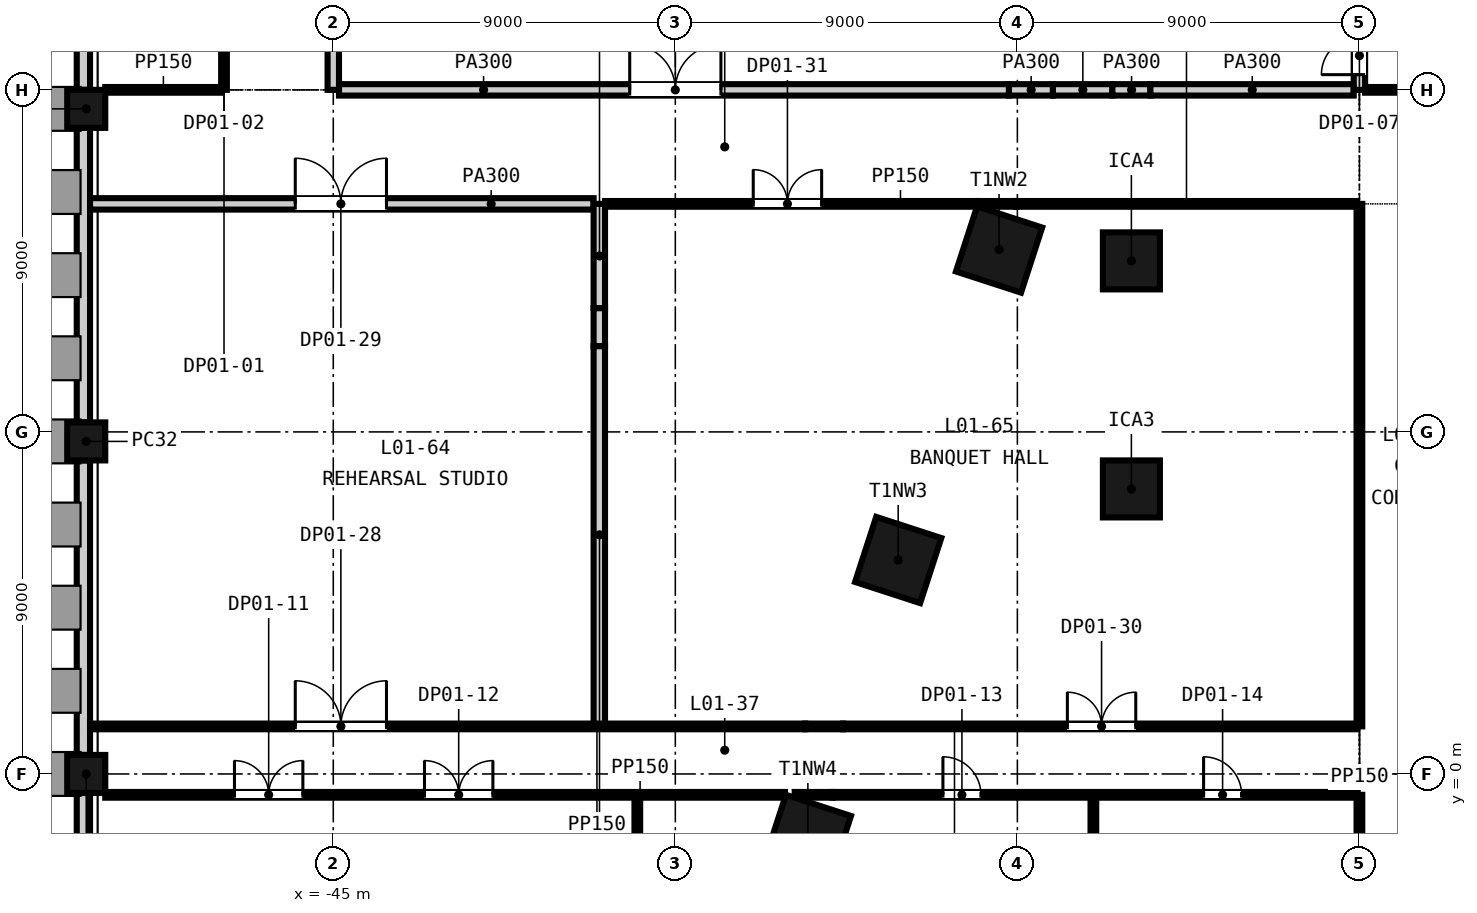
"""IFC4 building model, lengths in metres.
Left out: names, types, materials, properties, quantities, classifications, styles, units other than length and angle.
Written with IfcOpenShell. Run it as: python <this file> out.ifc"""

import sys

from ifc_helpers import new_model, si_unit, direction, frame, frame_2d, origin, origin_2d, place, context, subcontext, project, spatial, rectangle, extrude, element, fill, save


model = new_model("IFC4")
c1 = context("Model", 3, precision=1e-05, world=origin(), true_north=direction((0.0, 1.0)))
c2 = subcontext(c1, "Body", "Model", "MODEL_VIEW")
j1 = project(units=[si_unit("LENGTHUNIT", "METRE"), si_unit("PLANEANGLEUNIT", "RADIAN")], contexts=[c1])
p1 = place(None, origin())
s1 = spatial("IfcSite", under=j1, at=p1, CompositionType="ELEMENT")
p2 = place(p1, origin())
s2 = spatial("IfcBuilding", under=s1, at=p2, CompositionType="ELEMENT")
p3 = place(p2, frame((0.0, 0.0, 9.0)))
s3 = spatial("IfcBuildingStorey", under=s2, at=p3, CompositionType="ELEMENT", Elevation=9.0)
for number, where, z_axis, x_axis in (
    (1, (-27.482, 13.799, -0.4), (0.0, 0.0, 1.0), (-0.309, -0.951, 0.0)),
    (2, (-30.136, 5.63, -0.4), (0.0, 0.0, 1.0), (-0.309, -0.951, 0.0)),
    (3, (-32.512, -1.683, -0.4), (0.0, 0.0, 1.0), (-0.309, -0.951, 0.0)),
):
    element("IfcColumn", number, at=place(p3, frame(where, z_axis=z_axis, x_axis=x_axis)), inside=s3, PredefinedType="COLUMN", context=c2, shape_type="SweptSolid", body=[
        extrude(rectangle(XDim=1.8, YDim=1.8, at=origin_2d()), origin(), (0.0, 0.0, 1.0), 9.0),
    ])
for number, where, z_axis, x_axis in (
    (4, (-24.0, 7.5, -0.4), (0.0, 0.0, 1.0), (1.0, 0.0, 0.0)),
    (5, (-24.0, 13.5, -0.4), (0.0, 0.0, 1.0), (1.0, 0.0, 0.0)),
):
    element("IfcColumn", number, at=place(p3, frame(where, z_axis=z_axis, x_axis=x_axis)), inside=s3, PredefinedType="COLUMN", context=c2, shape_type="SweptSolid", body=[
        extrude(rectangle(XDim=1.5, YDim=1.5, at=origin_2d()), origin(), (0.0, 0.0, 1.0), 9.0),
    ])
for number, where, z_axis, x_axis in (
    (6, (-51.5, 17.5, -0.4), (0.0, 0.0, 1.0), (0.0, -1.0, 0.0)),
    (7, (-51.5, 8.75, -0.4), (0.0, 0.0, 1.0), (0.0, -1.0, 0.0)),
    (8, (-51.5, 0.0, -0.4), (0.0, 0.0, 1.0), (0.0, -1.0, 0.0)),
):
    element("IfcColumn", number, at=place(p3, frame(where, z_axis=z_axis, x_axis=x_axis)), inside=s3, PredefinedType="COLUMN", context=c2, shape_type="SweptSolid", body=[
        extrude(rectangle(XDim=1.0, YDim=1.0, at=origin_2d()), origin(), (0.0, 0.0, 1.0), 9.0),
    ])
for number, where, z_axis, x_axis in (
    (9, (-51.575, 25.75, -0.4), (0.0, 0.0, 1.0), (0.0, -1.0, 0.0)),
    (10, (-51.575, 17.0, -0.4), (0.0, 0.0, 1.0), (0.0, -1.0, 0.0)),
    (11, (-51.575, 8.25, -0.4), (0.0, 0.0, 1.0), (0.0, -1.0, 0.0)),
):
    element("IfcWall", number, at=place(p3, frame(where, z_axis=z_axis, x_axis=x_axis)), inside=s3, PredefinedType="SOLIDWALL", context=c2, shape_type="SweptSolid", body=[
        extrude(rectangle(XDim=7.75, YDim=0.35, at=frame_2d((3.875, 0.0))), origin(), (0.0, 0.0, 1.0), 8.1),
    ])
p4 = place(p3, frame((-51.575, -0.5, -0.4), z_axis=(0.0, 0.0, 1.0), x_axis=(0.0, -1.0, 0.0)))
e12 = element("IfcWall", 12, at=p4, inside=s3, PredefinedType="SOLIDWALL", context=c2, shape_type="SweptSolid", body=[
    extrude(rectangle(XDim=7.7, YDim=0.35, at=frame_2d((3.85, 0.0))), origin(), (0.0, 0.0, 1.0), 8.1),
])
p5 = place(p3, frame((-51.0, -0.549, 0.0), z_axis=(0.0, 0.0, 1.0), x_axis=(1.0, 0.0, 0.0)))
e13 = element("IfcWall", 13, at=p5, inside=s3, PredefinedType="PARTITIONING", context=c2, shape_type="SweptSolid", body=[
    extrude(rectangle(XDim=17.886, YDim=0.15, at=frame_2d((8.943, 0.0))), origin(), (0.0, 0.0, 1.0), 8.6),
])
p6 = place(p5, frame((3.4, 0.0, 0.0)))
e14 = element("IfcOpeningElement", 14, at=p6, cuts=e13, PredefinedType="OPENING", context=c2, shape_type="SweptSolid", body=[
    extrude(rectangle(XDim=1.8, YDim=2.4, at=frame_2d((0.9, 1.2))), frame((0.0, 0.085, 0.0), z_axis=(0.0, -1.0, 0.0), x_axis=(1.0, 0.0, 0.0)), (0.0, 0.0, 1.0), 0.17),
])
p7 = place(p5, frame((8.4, 0.0, 0.0)))
e15 = element("IfcOpeningElement", 15, at=p7, cuts=e13, PredefinedType="OPENING", context=c2, shape_type="SweptSolid", body=[
    extrude(rectangle(XDim=1.8, YDim=2.4, at=frame_2d((0.9, 1.2))), frame((0.0, 0.085, 0.0), z_axis=(0.0, -1.0, 0.0), x_axis=(1.0, 0.0, 0.0)), (0.0, 0.0, 1.0), 0.17),
])
p8 = place(p3, frame((-32.859, -0.549, 0.0), z_axis=(0.0, 0.0, 1.0), x_axis=(1.0, 0.0, 0.0)))
e16 = element("IfcWall", 16, at=p8, inside=s3, PredefinedType="PARTITIONING", context=c2, shape_type="SweptSolid", body=[
    extrude(rectangle(XDim=1.0, YDim=0.15, at=frame_2d((0.5, 0.0))), origin(), (0.0, 0.0, 1.0), 7.6),
])
p9 = place(p3, frame((-31.859, -0.549, 0.0), z_axis=(0.0, 0.0, 1.0), x_axis=(1.0, 0.0, 0.0)))
e17 = element("IfcWall", 17, at=p9, inside=s3, PredefinedType="PARTITIONING", context=c2, shape_type="SweptSolid", body=[
    extrude(rectangle(XDim=13.784, YDim=0.15, at=frame_2d((6.892, 0.0))), origin(), (0.0, 0.0, 1.0), 8.6),
])
p10 = place(p9, frame((2.9, 0.0, 0.0)))
e18 = element("IfcOpeningElement", 18, at=p10, cuts=e17, PredefinedType="OPENING", context=c2, shape_type="SweptSolid", body=[
    extrude(rectangle(XDim=1.0, YDim=2.1, at=frame_2d((0.5, 1.05))), frame((0.0, 0.085, 0.0), z_axis=(0.0, -1.0, 0.0), x_axis=(1.0, 0.0, 0.0)), (0.0, 0.0, 1.0), 0.17),
])
p11 = place(p9, frame((9.759, 0.0, 0.0)))
e19 = element("IfcOpeningElement", 19, at=p11, cuts=e17, PredefinedType="OPENING", context=c2, shape_type="SweptSolid", body=[
    extrude(rectangle(XDim=1.0, YDim=2.1, at=frame_2d((0.5, 1.05))), frame((0.0, 0.085, 0.0), z_axis=(0.0, -1.0, 0.0), x_axis=(1.0, 0.0, 0.0)), (0.0, 0.0, 1.0), 0.17),
])
p12 = place(p3, frame((-51.4, 1.251, 0.0), z_axis=(0.0, 0.0, 1.0), x_axis=(1.0, 0.0, 0.0)))
e20 = element("IfcWall", 20, at=p12, inside=s3, PredefinedType="PARTITIONING", context=c2, shape_type="SweptSolid", body=[
    extrude(rectangle(XDim=18.815, YDim=0.15, at=frame_2d((9.408, 0.0))), origin(), (0.0, 0.0, 1.0), 8.6),
])
p13 = place(p12, frame((5.4, 0.0, 0.0)))
e21 = element("IfcOpeningElement", 21, at=p13, cuts=e20, PredefinedType="OPENING", context=c2, shape_type="SweptSolid", body=[
    extrude(rectangle(XDim=2.4, YDim=2.4, at=frame_2d((1.2, 1.2))), frame((0.0, 0.085, 0.0), z_axis=(0.0, -1.0, 0.0), x_axis=(1.0, 0.0, 0.0)), (0.0, 0.0, 1.0), 0.17),
])
p14 = place(p3, frame((-32.584, 1.251, 0.0), z_axis=(0.0, 0.0, 1.0), x_axis=(1.0, 0.0, 0.0)))
e22 = element("IfcWall", 22, at=p14, inside=s3, PredefinedType="PARTITIONING", context=c2, shape_type="SweptSolid", body=[
    extrude(rectangle(XDim=1.0, YDim=0.15, at=frame_2d((0.5, 0.0))), origin(), (0.0, 0.0, 1.0), 7.6),
])
p15 = place(p3, frame((-31.584, 1.251, 0.0), z_axis=(0.0, 0.0, 1.0), x_axis=(1.0, 0.0, 0.0)))
e23 = element("IfcWall", 23, at=p15, inside=s3, PredefinedType="PARTITIONING", context=c2, shape_type="SweptSolid", body=[
    extrude(rectangle(XDim=13.51, YDim=0.15, at=frame_2d((6.755, 0.0))), origin(), (0.0, 0.0, 1.0), 8.6),
])
p16 = place(p15, frame((5.9, 0.0, 0.0)))
e24 = element("IfcOpeningElement", 24, at=p16, cuts=e23, PredefinedType="OPENING", context=c2, shape_type="SweptSolid", body=[
    extrude(rectangle(XDim=1.8, YDim=2.4, at=frame_2d((0.9, 1.2))), frame((0.0, 0.085, 0.0), z_axis=(0.0, -1.0, 0.0), x_axis=(1.0, 0.0, 0.0)), (0.0, 0.0, 1.0), 0.17),
])
p17 = place(p3, frame((-51.4, 15.0, 0.0), z_axis=(0.0, 0.0, 1.0), x_axis=(1.0, 0.0, 0.0)))
e25 = element("IfcWall", 25, at=p17, inside=s3, PredefinedType="PARTITIONING", context=c2, shape_type="SweptSolid", body=[
    extrude(rectangle(XDim=13.25, YDim=0.3, at=frame_2d((6.625, 0.0))), origin(), (0.0, 0.0, 1.0), 8.6),
])
p18 = place(p17, frame((5.4, 0.0, 0.0)))
e26 = element("IfcOpeningElement", 26, at=p18, cuts=e25, PredefinedType="OPENING", context=c2, shape_type="SweptSolid", body=[
    extrude(rectangle(XDim=2.4, YDim=2.4, at=frame_2d((1.2, 1.2))), frame((0.0, 0.16, 0.0), z_axis=(0.0, -1.0, 0.0), x_axis=(1.0, 0.0, 0.0)), (0.0, 0.0, 1.0), 0.32),
])
p19 = place(p3, frame((-37.85, 15.0, 0.0), z_axis=(0.0, 0.0, 1.0), x_axis=(1.0, 0.0, 0.0)))
e27 = element("IfcWall", 27, at=p19, inside=s3, PredefinedType="PARTITIONING", context=c2, shape_type="SweptSolid", body=[
    extrude(rectangle(XDim=9.788, YDim=0.15, at=frame_2d((4.894, 0.0))), origin(), (0.0, 0.0, 1.0), 8.6),
])
p20 = place(p19, frame((3.9, 0.0, 0.0)))
e28 = element("IfcOpeningElement", 28, at=p20, cuts=e27, PredefinedType="OPENING", context=c2, shape_type="SweptSolid", body=[
    extrude(rectangle(XDim=1.8, YDim=2.4, at=frame_2d((0.9, 1.2))), frame((0.0, 0.085, 0.0), z_axis=(0.0, -1.0, 0.0), x_axis=(1.0, 0.0, 0.0)), (0.0, 0.0, 1.0), 0.17),
])
p21 = place(p3, frame((-28.035, 15.0, 0.0), z_axis=(0.0, 0.0, 1.0), x_axis=(1.0, 0.0, 0.0)))
e29 = element("IfcWall", 29, at=p21, inside=s3, PredefinedType="PARTITIONING", context=c2, shape_type="SweptSolid", body=[
    extrude(rectangle(XDim=1.0, YDim=0.15, at=frame_2d((0.5, 0.0))), origin(), (0.0, 0.0, 1.0), 7.6),
])
p22 = place(p3, frame((-27.035, 15.0, 0.0), z_axis=(0.0, 0.0, 1.0), x_axis=(1.0, 0.0, 0.0)))
e30 = element("IfcWall", 30, at=p22, inside=s3, PredefinedType="PARTITIONING", context=c2, shape_type="SweptSolid", body=[
    extrude(rectangle(XDim=8.96, YDim=0.15, at=frame_2d((4.48, 0.0))), origin(), (0.0, 0.0, 1.0), 8.6),
])
p23 = place(p3, frame((-51.0, 18.0, 0.0), z_axis=(0.0, 0.0, 1.0), x_axis=(1.0, 0.0, 0.0)))
e31 = element("IfcWall", 31, at=p23, inside=s3, PredefinedType="PARTITIONING", context=c2, shape_type="SweptSolid", body=[
    extrude(rectangle(XDim=3.05, YDim=0.15, at=frame_2d((1.525, 0.0))), origin(), (0.0, 0.0, 1.0), 8.6),
])
p24 = place(p3, frame((-44.85, 18.0, 0.0), z_axis=(0.0, 0.0, 1.0), x_axis=(1.0, 0.0, 0.0)))
e32 = element("IfcWall", 32, at=p24, inside=s3, PredefinedType="PARTITIONING", context=c2, shape_type="SweptSolid", body=[
    extrude(rectangle(XDim=17.629, YDim=0.3, at=frame_2d((8.815, 0.0))), origin(), (0.0, 0.0, 1.0), 8.6),
])
p25 = place(p24, frame((7.65, 0.0, 0.0)))
e33 = element("IfcOpeningElement", 33, at=p25, cuts=e32, PredefinedType="OPENING", context=c2, shape_type="SweptSolid", body=[
    extrude(rectangle(XDim=2.4, YDim=2.4, at=frame_2d((1.2, 1.2))), frame((0.0, 0.16, 0.0), z_axis=(0.0, -1.0, 0.0), x_axis=(1.0, 0.0, 0.0)), (0.0, 0.0, 1.0), 0.32),
])
p26 = place(p3, frame((-27.221, 18.0, 0.0), z_axis=(0.0, 0.0, 1.0), x_axis=(1.0, 0.0, 0.0)))
e34 = element("IfcWall", 34, at=p26, inside=s3, PredefinedType="PARTITIONING", context=c2, shape_type="SweptSolid", body=[
    extrude(rectangle(XDim=1.156, YDim=0.3, at=frame_2d((0.578, 0.0))), origin(), (0.0, 0.0, 1.0), 7.6),
])
p27 = place(p3, frame((-26.064, 18.0, 0.0), z_axis=(0.0, 0.0, 1.0), x_axis=(1.0, 0.0, 0.0)))
e35 = element("IfcWall", 35, at=p27, inside=s3, PredefinedType="PARTITIONING", context=c2, shape_type="SweptSolid", body=[
    extrude(rectangle(XDim=1.564, YDim=0.3, at=frame_2d((0.782, 0.0))), origin(), (0.0, 0.0, 1.0), 8.6),
])
p28 = place(p3, frame((-24.5, 18.0, 0.0), z_axis=(0.0, 0.0, 1.0), x_axis=(1.0, 0.0, 0.0)))
e36 = element("IfcWall", 36, at=p28, inside=s3, PredefinedType="PARTITIONING", context=c2, shape_type="SweptSolid", body=[
    extrude(rectangle(XDim=1.0, YDim=0.3, at=frame_2d((0.5, 0.0))), origin(), (0.0, 0.0, 1.0), 7.997),
])
p29 = place(p3, frame((-23.5, 18.0, 0.0), z_axis=(0.0, 0.0, 1.0), x_axis=(1.0, 0.0, 0.0)))
e37 = element("IfcWall", 37, at=p29, inside=s3, PredefinedType="PARTITIONING", context=c2, shape_type="SweptSolid", body=[
    extrude(rectangle(XDim=5.35, YDim=0.3, at=frame_2d((2.675, 0.0))), origin(), (0.0, 0.0, 1.0), 8.6),
])
p30 = place(p3, frame((-17.85, 18.0, 0.0), z_axis=(0.0, 0.0, 1.0), x_axis=(1.0, 0.0, 0.0)))
e38 = element("IfcWall", 38, at=p30, inside=s3, PredefinedType="PARTITIONING", context=c2, shape_type="SweptSolid", body=[
    extrude(rectangle(XDim=35.7, YDim=0.15, at=frame_2d((17.85, 0.0))), origin(), (0.0, 0.0, 1.0), 8.6),
])
p31 = place(p30, frame((17.25, 0.0, 0.0)))
e39 = element("IfcOpeningElement", 39, at=p31, cuts=e38, PredefinedType="OPENING", context=c2, shape_type="SweptSolid", body=[
    extrude(rectangle(XDim=1.0, YDim=2.1, at=frame_2d((0.5, 1.05))), frame((0.0, 0.085, 0.0), z_axis=(0.0, -1.0, 0.0), x_axis=(1.0, 0.0, 0.0)), (0.0, 0.0, 1.0), 0.17),
])
p32 = place(p3, frame((-47.875, 18.0, 0.0), z_axis=(0.0, 0.0, 1.0), x_axis=(0.0, 1.0, 0.0)))
e40 = element("IfcWall", 40, at=p32, inside=s3, PredefinedType="PARTITIONING", context=c2, shape_type="SweptSolid", body=[
    extrude(rectangle(XDim=8.7, YDim=0.15, at=frame_2d((4.35, 0.0))), origin(), (0.0, 0.0, 1.0), 8.6),
])
p33 = place(p32, frame((3.65, 0.0, 0.0)))
e41 = element("IfcOpeningElement", 41, at=p33, cuts=e40, PredefinedType="OPENING", context=c2, shape_type="SweptSolid", body=[
    extrude(rectangle(XDim=0.9, YDim=2.1, at=frame_2d((0.45, 1.05))), frame((0.0, 0.085, 0.0), z_axis=(0.0, -1.0, 0.0), x_axis=(1.0, 0.0, 0.0)), (0.0, 0.0, 1.0), 0.17),
])
p34 = place(p3, frame((-45.0, 18.0, 0.0), z_axis=(0.0, 0.0, 1.0), x_axis=(0.0, 1.0, 0.0)))
e42 = element("IfcWall", 42, at=p34, inside=s3, PredefinedType="PARTITIONING", context=c2, shape_type="SweptSolid", body=[
    extrude(rectangle(XDim=7.431, YDim=0.3, at=frame_2d((3.715, 0.0))), origin(), (0.0, 0.0, 1.0), 8.6),
])
p35 = place(p3, frame((-38.0, 1.326, 0.0), z_axis=(0.0, 0.0, 1.0), x_axis=(0.0, 1.0, 0.0)))
e43 = element("IfcWall", 43, at=p35, inside=s3, PredefinedType="PARTITIONING", context=c2, shape_type="SweptSolid", body=[
    extrude(rectangle(XDim=9.932, YDim=0.3, at=frame_2d((4.966, 0.0))), origin(), (0.0, 0.0, 1.0), 8.6),
])
p36 = place(p3, frame((-38.0, 11.258, 0.0), z_axis=(0.0, 0.0, 1.0), x_axis=(0.0, 1.0, 0.0)))
e44 = element("IfcWall", 44, at=p36, inside=s3, PredefinedType="PARTITIONING", context=c2, shape_type="SweptSolid", body=[
    extrude(rectangle(XDim=1.0, YDim=0.3, at=frame_2d((0.5, 0.0))), origin(), (0.0, 0.0, 1.0), 7.619),
])
p37 = place(p3, frame((-38.0, 12.258, 0.0), z_axis=(0.0, 0.0, 1.0), x_axis=(0.0, 1.0, 0.0)))
e45 = element("IfcWall", 45, at=p37, inside=s3, PredefinedType="PARTITIONING", context=c2, shape_type="SweptSolid", body=[
    extrude(rectangle(XDim=2.742, YDim=0.3, at=frame_2d((1.371, 0.0))), origin(), (0.0, 0.0, 1.0), 8.6),
])
for number, where, z_axis, x_axis in (
    (46, (-37.0, -9.4, 0.0), (0.0, 0.0, 1.0), (0.0, 1.0, 0.0)),
    (47, (-25.0, -9.4, 0.0), (0.0, 0.0, 1.0), (0.0, 1.0, 0.0)),
):
    element("IfcWall", number, at=place(p3, frame(where, z_axis=z_axis, x_axis=x_axis)), inside=s3, PredefinedType="PARTITIONING", context=c2, shape_type="SweptSolid", body=[
        extrude(rectangle(XDim=8.776, YDim=0.15, at=frame_2d((4.388, 0.0))), origin(), (0.0, 0.0, 1.0), 8.6),
    ])
p38 = place(p3, frame((-18.0, -3.2, 0.0), z_axis=(0.0, 0.0, 1.0), x_axis=(0.0, 1.0, 0.0)))
e48 = element("IfcWall", 48, at=p38, inside=s3, PredefinedType="PARTITIONING", context=c2, shape_type="SweptSolid", body=[
    extrude(rectangle(XDim=2.651, YDim=0.15, at=frame_2d((1.326, 0.0))), origin(), (0.0, 0.0, 1.0), 8.6),
])
p39 = place(p3, frame((-18.0, 1.251, 0.0), z_axis=(0.0, 0.0, 1.0), x_axis=(0.0, 1.0, 0.0)))
e49 = element("IfcWall", 49, at=p39, inside=s3, PredefinedType="PARTITIONING", context=c2, shape_type="SweptSolid", body=[
    extrude(rectangle(XDim=13.749, YDim=0.15, at=frame_2d((6.875, 0.0))), origin(), (0.0, 0.0, 1.0), 8.6),
])
p40 = place(p3, frame((-18.0, 18.0, 0.0), z_axis=(0.0, 0.0, 1.0), x_axis=(0.0, 1.0, 0.0)))
e50 = element("IfcWall", 50, at=p40, inside=s3, PredefinedType="PARTITIONING", context=c2, shape_type="SweptSolid", body=[
    extrude(rectangle(XDim=1.807, YDim=0.3, at=frame_2d((0.904, 0.0))), origin(), (0.0, 0.0, 1.0), 8.6),
])
p41 = place(p40, frame((0.4, 0.0, 0.0)))
e51 = element("IfcOpeningElement", 51, at=p41, cuts=e50, PredefinedType="OPENING", context=c2, shape_type="SweptSolid", body=[
    extrude(rectangle(XDim=1.0, YDim=2.1, at=frame_2d((0.5, 1.05))), frame((0.0, 0.16, 0.0), z_axis=(0.0, -1.0, 0.0), x_axis=(1.0, 0.0, 0.0)), (0.0, 0.0, 1.0), 0.32),
])
p42 = place(p41, origin())
e52 = element("IfcDoor", 52, at=p42, inside=s3, OperationType="SINGLE_SWING_LEFT", PredefinedType="DOOR", context=c2, shape_type="SweptSolid", body=[
    extrude(rectangle(XDim=1.0, YDim=2.1, at=frame_2d((0.5, 1.05))), frame((0.0, 0.025, 0.0), z_axis=(0.0, -1.0, 0.0), x_axis=(1.0, 0.0, 0.0)), (0.0, 0.0, 1.0), 0.05),
])
fill(e51, e52)
p43 = place(p6, origin())
e53 = element("IfcDoor", 53, at=p43, inside=s3, OperationType="SINGLE_SWING_LEFT", PredefinedType="DOOR", context=c2, shape_type="SweptSolid", body=[
    extrude(rectangle(XDim=1.8, YDim=2.4, at=frame_2d((0.9, 1.2))), frame((0.0, 0.025, 0.0), z_axis=(0.0, -1.0, 0.0), x_axis=(1.0, 0.0, 0.0)), (0.0, 0.0, 1.0), 0.05),
])
fill(e14, e53)
p44 = place(p7, origin())
e54 = element("IfcDoor", 54, at=p44, inside=s3, OperationType="SINGLE_SWING_LEFT", PredefinedType="DOOR", context=c2, shape_type="SweptSolid", body=[
    extrude(rectangle(XDim=1.8, YDim=2.4, at=frame_2d((0.9, 1.2))), frame((0.0, 0.025, 0.0), z_axis=(0.0, -1.0, 0.0), x_axis=(1.0, 0.0, 0.0)), (0.0, 0.0, 1.0), 0.05),
])
fill(e15, e54)
p45 = place(p10, origin())
e55 = element("IfcDoor", 55, at=p45, inside=s3, OperationType="SINGLE_SWING_LEFT", PredefinedType="DOOR", context=c2, shape_type="SweptSolid", body=[
    extrude(rectangle(XDim=1.0, YDim=2.1, at=frame_2d((0.5, 1.05))), frame((0.0, 0.025, 0.0), z_axis=(0.0, -1.0, 0.0), x_axis=(1.0, 0.0, 0.0)), (0.0, 0.0, 1.0), 0.05),
])
fill(e18, e55)
p46 = place(p11, origin())
e56 = element("IfcDoor", 56, at=p46, inside=s3, OperationType="SINGLE_SWING_LEFT", PredefinedType="DOOR", context=c2, shape_type="SweptSolid", body=[
    extrude(rectangle(XDim=1.0, YDim=2.1, at=frame_2d((0.5, 1.05))), frame((0.0, 0.025, 0.0), z_axis=(0.0, -1.0, 0.0), x_axis=(1.0, 0.0, 0.0)), (0.0, 0.0, 1.0), 0.05),
])
fill(e19, e56)
p47 = place(p25, origin())
e57 = element("IfcDoor", 57, at=p47, inside=s3, OperationType="SINGLE_SWING_LEFT", PredefinedType="DOOR", context=c2, shape_type="SweptSolid", body=[
    extrude(rectangle(XDim=2.4, YDim=2.4, at=frame_2d((1.2, 1.2))), frame((0.0, 0.025, 0.0), z_axis=(0.0, -1.0, 0.0), x_axis=(1.0, 0.0, 0.0)), (0.0, 0.0, 1.0), 0.05),
])
fill(e33, e57)
p48 = place(p13, origin())
e58 = element("IfcDoor", 58, at=p48, inside=s3, OperationType="SINGLE_SWING_LEFT", PredefinedType="DOOR", context=c2, shape_type="SweptSolid", body=[
    extrude(rectangle(XDim=2.4, YDim=2.4, at=frame_2d((1.2, 1.2))), frame((0.0, 0.025, 0.0), z_axis=(0.0, -1.0, 0.0), x_axis=(1.0, 0.0, 0.0)), (0.0, 0.0, 1.0), 0.05),
])
fill(e21, e58)
p49 = place(p18, origin())
e59 = element("IfcDoor", 59, at=p49, inside=s3, OperationType="SINGLE_SWING_LEFT", PredefinedType="DOOR", context=c2, shape_type="SweptSolid", body=[
    extrude(rectangle(XDim=2.4, YDim=2.4, at=frame_2d((1.2, 1.2))), frame((0.0, 0.025, 0.0), z_axis=(0.0, -1.0, 0.0), x_axis=(1.0, 0.0, 0.0)), (0.0, 0.0, 1.0), 0.05),
])
fill(e26, e59)
p50 = place(p16, origin())
e60 = element("IfcDoor", 60, at=p50, inside=s3, OperationType="SINGLE_SWING_LEFT", PredefinedType="DOOR", context=c2, shape_type="SweptSolid", body=[
    extrude(rectangle(XDim=1.8, YDim=2.4, at=frame_2d((0.9, 1.2))), frame((0.0, 0.025, 0.0), z_axis=(0.0, -1.0, 0.0), x_axis=(1.0, 0.0, 0.0)), (0.0, 0.0, 1.0), 0.05),
])
fill(e24, e60)
p51 = place(p20, origin())
e61 = element("IfcDoor", 61, at=p51, inside=s3, OperationType="SINGLE_SWING_LEFT", PredefinedType="DOOR", context=c2, shape_type="SweptSolid", body=[
    extrude(rectangle(XDim=1.8, YDim=2.4, at=frame_2d((0.9, 1.2))), frame((0.0, 0.025, 0.0), z_axis=(0.0, -1.0, 0.0), x_axis=(1.0, 0.0, 0.0)), (0.0, 0.0, 1.0), 0.05),
])
fill(e28, e61)
save(model, sys.argv[1])
